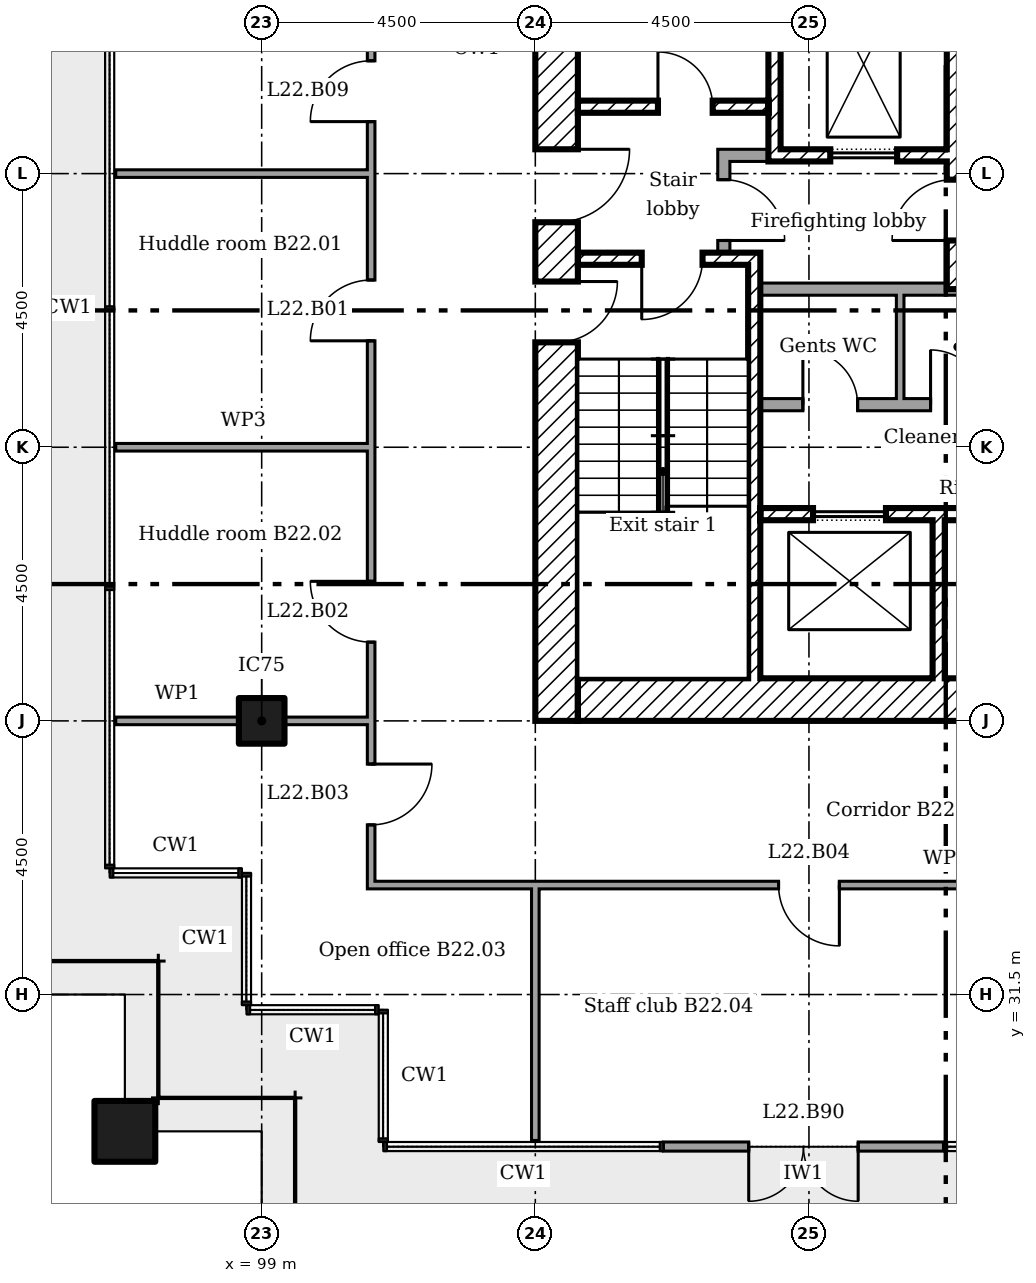
"""IFC4 building model, lengths in metres.
Left out: names, types, materials, properties, quantities, classifications, styles, units other than length and angle.
Written with IfcOpenShell. Run it as: python <this file> out.ifc"""

import sys

from ifc_helpers import new_model, si_unit, direction, frame, frame_2d, origin, origin_2d, place, context, subcontext, project, spatial, rectangle, extrude, element, fill, save


model = new_model("IFC4")
c1 = context("Model", 3, precision=1e-05, world=origin(), true_north=direction((0.0, 1.0)))
c2 = subcontext(c1, "Body", "Model", "MODEL_VIEW")
j1 = project(units=[si_unit("LENGTHUNIT", "METRE"), si_unit("PLANEANGLEUNIT", "RADIAN")], contexts=[c1])
p1 = place(None, origin())
s1 = spatial("IfcSite", under=j1, at=p1, CompositionType="ELEMENT")
p2 = place(p1, origin())
s2 = spatial("IfcBuilding", under=s1, at=p2, CompositionType="ELEMENT")
p3 = place(p2, frame((0.0, 0.0, 92.0)))
s3 = spatial("IfcBuildingStorey", under=s2, at=p3, CompositionType="ELEMENT", Elevation=92.0)
p4 = place(p3, frame((96.75, 29.25, 0.0)))
e1 = element("IfcColumn", 1, at=p4, inside=s3, PredefinedType="COLUMN", context=c2, shape_type="SweptSolid", body=[
    extrude(rectangle(XDim=1.0, YDim=1.0, at=origin_2d()), origin(), (0.0, 0.0, 1.0), 3.6),
])
p5 = place(p3, frame((99.0, 36.0, 0.0)))
e2 = element("IfcColumn", 2, at=p5, inside=s3, PredefinedType="COLUMN", context=c2, shape_type="SweptSolid", body=[
    extrude(rectangle(XDim=0.75, YDim=0.75, at=origin_2d()), origin(), (0.0, 0.0, 1.0), 3.6),
])
p6 = place(p3, frame((105.606, 29.0, 0.0)))
e3 = element("IfcWall", 3, at=p6, inside=s3, PredefinedType="SOLIDWALL", context=c2, shape_type="SweptSolid", body=[
    extrude(rectangle(XDim=4.606, YDim=0.15, at=frame_2d((2.303, 0.0))), origin(), (0.0, 0.0, 1.0), 3.1),
])
p7 = place(p6, frame((1.403, 0.0, 0.0)))
e4 = element("IfcOpeningElement", 4, at=p7, cuts=e3, PredefinedType="OPENING", context=c2, shape_type="SweptSolid", body=[
    extrude(rectangle(XDim=1.8, YDim=2.4, at=frame_2d((0.9, 1.2))), frame((0.0, 0.085, 0.0), z_axis=(0.0, -1.0, 0.0), x_axis=(1.0, 0.0, 0.0)), (0.0, 0.0, 1.0), 0.17),
])
p8 = place(p3, frame((104.2, 36.35, 0.0)))
e5 = element("IfcWall", 5, at=p8, inside=s3, PredefinedType="SHEAR", context=c2, shape_type="SweptSolid", body=[
    extrude(rectangle(XDim=12.1, YDim=0.7, at=frame_2d((6.05, 0.0))), origin(), (0.0, 0.0, 1.0), 3.35),
])
p9 = place(p3, frame((103.85, 36.0, 0.0), z_axis=(0.0, 0.0, 1.0), x_axis=(0.0, 1.0, 0.0)))
e6 = element("IfcWall", 6, at=p9, inside=s3, PredefinedType="SHEAR", context=c2, shape_type="SweptSolid", body=[
    extrude(rectangle(XDim=13.5, YDim=0.7, at=frame_2d((6.75, 0.0))), origin(), (0.0, 0.0, 1.0), 3.35),
])
p10 = place(p9, frame((8.2, 0.0, 0.0)))
e7 = element("IfcOpeningElement", 7, at=p10, cuts=e6, PredefinedType="OPENING", context=c2, shape_type="SweptSolid", body=[
    extrude(rectangle(XDim=1.2, YDim=2.1, at=frame_2d((0.6, 1.05))), frame((0.0, 0.36, 0.0), z_axis=(0.0, -1.0, 0.0), x_axis=(1.0, 0.0, 0.0)), (0.0, 0.0, 1.0), 0.72),
])
p11 = place(p9, frame((6.225, 0.0, 0.0)))
e8 = element("IfcOpeningElement", 8, at=p11, cuts=e6, PredefinedType="OPENING", context=c2, shape_type="SweptSolid", body=[
    extrude(rectangle(XDim=1.0, YDim=2.1, at=frame_2d((0.5, 1.05))), frame((0.0, 0.36, 0.0), z_axis=(0.0, -1.0, 0.0), x_axis=(1.0, 0.0, 0.0)), (0.0, 0.0, 1.0), 0.72),
])
p12 = place(p3, frame((107.433, 48.8, 0.0), z_axis=(0.0, 0.0, 1.0), x_axis=(0.0, -1.0, 0.0)))
e9 = element("IfcWall", 9, at=p12, inside=s3, PredefinedType="SHEAR", context=c2, shape_type="SweptSolid", body=[
    extrude(rectangle(XDim=3.6, YDim=0.2, at=frame_2d((1.8, 0.0))), origin(), (0.0, 0.0, 1.0), 3.35),
])
p13 = place(p3, frame((110.367, 48.8, 0.0), z_axis=(0.0, 0.0, 1.0), x_axis=(0.0, -1.0, 0.0)))
e10 = element("IfcWall", 10, at=p13, inside=s3, PredefinedType="SHEAR", context=c2, shape_type="SweptSolid", body=[
    extrude(rectangle(XDim=5.7, YDim=0.2, at=frame_2d((2.85, 0.0))), origin(), (0.0, 0.0, 1.0), 3.35),
])
p14 = place(p13, frame((3.9, 0.0, 0.0)))
e11 = element("IfcOpeningElement", 11, at=p14, cuts=e10, PredefinedType="OPENING", context=c2, shape_type="SweptSolid", body=[
    extrude(rectangle(XDim=1.0, YDim=2.1, at=frame_2d((0.5, 1.05))), frame((0.0, 0.11, 0.0), z_axis=(0.0, -1.0, 0.0), x_axis=(1.0, 0.0, 0.0)), (0.0, 0.0, 1.0), 0.22),
])
p15 = place(p3, frame((110.133, 36.7, 0.0), z_axis=(0.0, 0.0, 1.0), x_axis=(0.0, 1.0, 0.0)))
e12 = element("IfcWall", 12, at=p15, inside=s3, PredefinedType="SHEAR", context=c2, shape_type="SweptSolid", body=[
    extrude(rectangle(XDim=2.6, YDim=0.2, at=frame_2d((1.3, 0.0))), origin(), (0.0, 0.0, 1.0), 3.35),
])
p16 = place(p3, frame((106.5, 45.3, 0.0)))
e13 = element("IfcWall", 13, at=p16, inside=s3, PredefinedType="PARTITIONING", context=c2, shape_type="SweptSolid", body=[
    extrude(rectangle(XDim=0.833, YDim=0.2, at=frame_2d((0.417, 0.0))), origin(), (0.0, 0.0, 1.0), 3.35),
])
p17 = place(p3, frame((106.6, 43.7, 0.0), z_axis=(0.0, 0.0, 1.0), x_axis=(0.0, 1.0, 0.0)))
e14 = element("IfcWall", 14, at=p17, inside=s3, PredefinedType="PARTITIONING", context=c2, shape_type="SweptSolid", body=[
    extrude(rectangle(XDim=1.5, YDim=0.2, at=frame_2d((0.75, 0.0))), origin(), (0.0, 0.0, 1.0), 3.35),
])
p18 = place(p17, frame((0.2, 0.0, 0.0)))
e15 = element("IfcOpeningElement", 15, at=p18, cuts=e14, PredefinedType="OPENING", context=c2, shape_type="SweptSolid", body=[
    extrude(rectangle(XDim=1.0, YDim=2.1, at=frame_2d((0.5, 1.05))), frame((0.0, 0.11, 0.0), z_axis=(0.0, -1.0, 0.0), x_axis=(1.0, 0.0, 0.0)), (0.0, 0.0, 1.0), 0.22),
])
p19 = place(p3, frame((104.2, 46.1, 0.0)))
e16 = element("IfcWall", 16, at=p19, inside=s3, PredefinedType="SHEAR", context=c2, shape_type="SweptSolid", body=[
    extrude(rectangle(XDim=3.133, YDim=0.2, at=frame_2d((1.567, 0.0))), origin(), (0.0, 0.0, 1.0), 3.35),
])
p20 = place(p19, frame((1.317, 0.0, 0.0)))
e17 = element("IfcOpeningElement", 17, at=p20, cuts=e16, PredefinedType="OPENING", context=c2, shape_type="SweptSolid", body=[
    extrude(rectangle(XDim=0.9, YDim=2.1, at=frame_2d((0.45, 1.05))), frame((0.0, 0.11, 0.0), z_axis=(0.0, -1.0, 0.0), x_axis=(1.0, 0.0, 0.0)), (0.0, 0.0, 1.0), 0.22),
])
p21 = place(p3, frame((107.533, 45.3, 0.0)))
e18 = element("IfcWall", 18, at=p21, inside=s3, PredefinedType="SHEAR", context=c2, shape_type="SweptSolid", body=[
    extrude(rectangle(XDim=2.733, YDim=0.2, at=frame_2d((1.367, 0.0))), origin(), (0.0, 0.0, 1.0), 3.35),
])
p22 = place(p21, frame((0.817, 0.0, 0.0)))
e19 = element("IfcOpeningElement", 19, at=p22, cuts=e18, PredefinedType="OPENING", context=c2, shape_type="SweptSolid", body=[
    extrude(rectangle(XDim=1.1, YDim=2.1, at=frame_2d((0.55, 1.05))), frame((0.0, 0.11, 0.0), z_axis=(0.0, -1.0, 0.0), x_axis=(1.0, 0.0, 0.0)), (0.0, 0.0, 1.0), 0.22),
])
p23 = place(p3, frame((107.2, 39.4, 0.0)))
e20 = element("IfcWall", 20, at=p23, inside=s3, PredefinedType="SHEAR", context=c2, shape_type="SweptSolid", body=[
    extrude(rectangle(XDim=9.1, YDim=0.2, at=frame_2d((4.55, 0.0))), origin(), (0.0, 0.0, 1.0), 3.35),
])
p24 = place(p23, frame((0.867, 0.0, 0.0)))
e21 = element("IfcOpeningElement", 21, at=p24, cuts=e20, PredefinedType="OPENING", context=c2, shape_type="SweptSolid", body=[
    extrude(rectangle(XDim=1.2, YDim=2.1, at=frame_2d((0.6, 1.05))), frame((0.0, 0.11, 0.0), z_axis=(0.0, -1.0, 0.0), x_axis=(1.0, 0.0, 0.0)), (0.0, 0.0, 1.0), 0.22),
])
p25 = place(p23, frame((3.8, 0.0, 0.0)))
e22 = element("IfcOpeningElement", 22, at=p25, cuts=e20, PredefinedType="OPENING", context=c2, shape_type="SweptSolid", body=[
    extrude(rectangle(XDim=1.2, YDim=2.1, at=frame_2d((0.6, 1.05))), frame((0.0, 0.11, 0.0), z_axis=(0.0, -1.0, 0.0), x_axis=(1.0, 0.0, 0.0)), (0.0, 0.0, 1.0), 0.22),
])
p26 = place(p23, frame((6.733, 0.0, 0.0)))
e23 = element("IfcOpeningElement", 23, at=p26, cuts=e20, PredefinedType="OPENING", context=c2, shape_type="SweptSolid", body=[
    extrude(rectangle(XDim=1.2, YDim=2.1, at=frame_2d((0.6, 1.05))), frame((0.0, 0.11, 0.0), z_axis=(0.0, -1.0, 0.0), x_axis=(1.0, 0.0, 0.0)), (0.0, 0.0, 1.0), 0.22),
])
p27 = place(p3, frame((107.1, 36.7, 0.0), z_axis=(0.0, 0.0, 1.0), x_axis=(0.0, 1.0, 0.0)))
e24 = element("IfcWall", 24, at=p27, inside=s3, PredefinedType="SHEAR", context=c2, shape_type="SweptSolid", body=[
    extrude(rectangle(XDim=7.0, YDim=0.2, at=frame_2d((3.5, 0.0))), origin(), (0.0, 0.0, 1.0), 3.35),
])
p28 = place(p3, frame((104.2, 43.6, 0.0)))
e25 = element("IfcWall", 25, at=p28, inside=s3, PredefinedType="SHEAR", context=c2, shape_type="SweptSolid", body=[
    extrude(rectangle(XDim=2.8, YDim=0.2, at=frame_2d((1.4, 0.0))), origin(), (0.0, 0.0, 1.0), 3.35),
])
p29 = place(p28, frame((1.05, 0.0, 0.0)))
e26 = element("IfcOpeningElement", 26, at=p29, cuts=e25, PredefinedType="OPENING", context=c2, shape_type="SweptSolid", body=[
    extrude(rectangle(XDim=1.0, YDim=2.1, at=frame_2d((0.5, 1.05))), frame((0.0, 0.11, 0.0), z_axis=(0.0, -1.0, 0.0), x_axis=(1.0, 0.0, 0.0)), (0.0, 0.0, 1.0), 0.22),
])
p30 = place(p3, frame((107.2, 43.1, 0.0)))
e27 = element("IfcWall", 27, at=p30, inside=s3, PredefinedType="PARTITIONING", context=c2, shape_type="SweptSolid", body=[
    extrude(rectangle(XDim=6.1, YDim=0.2, at=frame_2d((3.05, 0.0))), origin(), (0.0, 0.0, 1.0), 3.35),
])
p31 = place(p30, frame((4.7, 0.0, 0.0)))
e28 = element("IfcOpeningElement", 28, at=p31, cuts=e27, PredefinedType="OPENING", context=c2, shape_type="SweptSolid", body=[
    extrude(rectangle(XDim=0.9, YDim=2.1, at=frame_2d((0.45, 1.05))), frame((0.0, 0.11, 0.0), z_axis=(0.0, -1.0, 0.0), x_axis=(1.0, 0.0, 0.0)), (0.0, 0.0, 1.0), 0.22),
])
p32 = place(p3, frame((107.2, 41.2, 0.0)))
e29 = element("IfcWall", 29, at=p32, inside=s3, PredefinedType="PARTITIONING", context=c2, shape_type="SweptSolid", body=[
    extrude(rectangle(XDim=6.1, YDim=0.2, at=frame_2d((3.05, 0.0))), origin(), (0.0, 0.0, 1.0), 3.35),
])
p33 = place(p32, frame((0.7, 0.0, 0.0)))
e30 = element("IfcOpeningElement", 30, at=p33, cuts=e29, PredefinedType="OPENING", context=c2, shape_type="SweptSolid", body=[
    extrude(rectangle(XDim=0.9, YDim=2.1, at=frame_2d((0.45, 1.05))), frame((0.0, 0.11, 0.0), z_axis=(0.0, -1.0, 0.0), x_axis=(1.0, 0.0, 0.0)), (0.0, 0.0, 1.0), 0.22),
])
p34 = place(p32, frame((2.8, 0.0, 0.0)))
e31 = element("IfcOpeningElement", 31, at=p34, cuts=e29, PredefinedType="OPENING", context=c2, shape_type="SweptSolid", body=[
    extrude(rectangle(XDim=0.9, YDim=2.1, at=frame_2d((0.45, 1.05))), frame((0.0, 0.11, 0.0), z_axis=(0.0, -1.0, 0.0), x_axis=(1.0, 0.0, 0.0)), (0.0, 0.0, 1.0), 0.22),
])
p35 = place(p3, frame((109.5, 41.3, 0.0), z_axis=(0.0, 0.0, 1.0), x_axis=(0.0, 1.0, 0.0)))
e32 = element("IfcWall", 32, at=p35, inside=s3, PredefinedType="PARTITIONING", context=c2, shape_type="SweptSolid", body=[
    extrude(rectangle(XDim=1.7, YDim=0.125, at=frame_2d((0.85, 0.0))), origin(), (0.0, 0.0, 1.0), 3.35),
])
p36 = place(p3, frame((100.738, 33.3, 0.0)))
e33 = element("IfcWall", 33, at=p36, inside=s3, PredefinedType="PARTITIONING", context=c2, shape_type="SweptSolid", body=[
    extrude(rectangle(XDim=19.025, YDim=0.125, at=frame_2d((9.512, 0.0))), origin(), (0.0, 0.0, 1.0), 3.45),
])
p37 = place(p36, frame((6.762, 0.0, 0.0)))
e34 = element("IfcOpeningElement", 34, at=p37, cuts=e33, PredefinedType="OPENING", context=c2, shape_type="SweptSolid", body=[
    extrude(rectangle(XDim=1.0, YDim=2.1, at=frame_2d((0.5, 1.05))), frame((0.0, 0.073, 0.0), z_axis=(0.0, -1.0, 0.0), x_axis=(1.0, 0.0, 0.0)), (0.0, 0.0, 1.0), 0.145),
])
p38 = place(p36, frame((13.058, 0.0, 0.0)))
e35 = element("IfcOpeningElement", 35, at=p38, cuts=e33, PredefinedType="OPENING", context=c2, shape_type="SweptSolid", body=[
    extrude(rectangle(XDim=1.0, YDim=2.1, at=frame_2d((0.5, 1.05))), frame((0.0, 0.073, 0.0), z_axis=(0.0, -1.0, 0.0), x_axis=(1.0, 0.0, 0.0)), (0.0, 0.0, 1.0), 0.145),
])
p39 = place(p3, frame((96.6, 36.0, 0.0)))
e36 = element("IfcWall", 36, at=p39, inside=s3, PredefinedType="PARTITIONING", context=c2, shape_type="SweptSolid", body=[
    extrude(rectangle(XDim=2.025, YDim=0.125, at=frame_2d((1.012, 0.0))), origin(), (0.0, 0.0, 1.0), 2.842),
])
p40 = place(p3, frame((99.375, 36.0, 0.0)))
e37 = element("IfcWall", 37, at=p40, inside=s3, PredefinedType="PARTITIONING", context=c2, shape_type="SweptSolid", body=[
    extrude(rectangle(XDim=1.425, YDim=0.125, at=frame_2d((0.712, 0.0))), origin(), (0.0, 0.0, 1.0), 2.842),
])
p41 = place(p3, frame((96.6, 40.5, 0.0)))
e38 = element("IfcWall", 38, at=p41, inside=s3, PredefinedType="MOVABLE", context=c2, shape_type="SweptSolid", body=[
    extrude(rectangle(XDim=4.2, YDim=0.125, at=frame_2d((2.1, 0.0))), origin(), (0.0, 0.0, 1.0), 2.851),
])
p42 = place(p3, frame((96.6, 45.0, 0.0)))
e39 = element("IfcWall", 39, at=p42, inside=s3, PredefinedType="PARTITIONING", context=c2, shape_type="SweptSolid", body=[
    extrude(rectangle(XDim=4.2, YDim=0.125, at=frame_2d((2.1, 0.0))), origin(), (0.0, 0.0, 1.0), 2.851),
])
p43 = place(p3, frame((100.8, 33.363, 0.0), z_axis=(0.0, 0.0, 1.0), x_axis=(0.0, 1.0, 0.0)))
e40 = element("IfcWall", 40, at=p43, inside=s3, PredefinedType="PARTITIONING", context=c2, shape_type="SweptSolid", body=[
    extrude(rectangle(XDim=14.075, YDim=0.125, at=frame_2d((7.038, 0.0))), origin(), (0.0, 0.0, 1.0), 3.45),
])
p44 = place(p43, frame((8.887, 0.0, 0.0)))
e41 = element("IfcOpeningElement", 41, at=p44, cuts=e40, PredefinedType="OPENING", context=c2, shape_type="SweptSolid", body=[
    extrude(rectangle(XDim=1.0, YDim=2.1, at=frame_2d((0.5, 1.05))), frame((0.0, 0.073, 0.0), z_axis=(0.0, -1.0, 0.0), x_axis=(1.0, 0.0, 0.0)), (0.0, 0.0, 1.0), 0.145),
])
p45 = place(p43, frame((3.933, 0.0, 0.0)))
e42 = element("IfcOpeningElement", 42, at=p45, cuts=e40, PredefinedType="OPENING", context=c2, shape_type="SweptSolid", body=[
    extrude(rectangle(XDim=1.0, YDim=2.1, at=frame_2d((0.5, 1.05))), frame((0.0, 0.073, 0.0), z_axis=(0.0, -1.0, 0.0), x_axis=(1.0, 0.0, 0.0)), (0.0, 0.0, 1.0), 0.145),
])
p46 = place(p43, frame((0.927, 0.0, 0.0)))
e43 = element("IfcOpeningElement", 43, at=p46, cuts=e40, PredefinedType="OPENING", context=c2, shape_type="SweptSolid", body=[
    extrude(rectangle(XDim=1.0, YDim=2.1, at=frame_2d((0.5, 1.05))), frame((0.0, 0.073, 0.0), z_axis=(0.0, -1.0, 0.0), x_axis=(1.0, 0.0, 0.0)), (0.0, 0.0, 1.0), 0.145),
])
p47 = place(p43, frame((12.492, 0.0, 0.0)))
e44 = element("IfcOpeningElement", 44, at=p47, cuts=e40, PredefinedType="OPENING", context=c2, shape_type="SweptSolid", body=[
    extrude(rectangle(XDim=1.0, YDim=2.1, at=frame_2d((0.5, 1.05))), frame((0.0, 0.073, 0.0), z_axis=(0.0, -1.0, 0.0), x_axis=(1.0, 0.0, 0.0)), (0.0, 0.0, 1.0), 0.145),
])
p48 = place(p3, frame((103.5, 29.1, 0.0), z_axis=(0.0, 0.0, 1.0), x_axis=(0.0, 1.0, 0.0)))
e45 = element("IfcWall", 45, at=p48, inside=s3, PredefinedType="PARTITIONING", context=c2, shape_type="SweptSolid", body=[
    extrude(rectangle(XDim=4.2, YDim=0.125, at=frame_2d((2.1, 0.0))), origin(), (0.0, 0.0, 1.0), 2.851),
])
p49 = place(p7, frame((1.8, 0.0, 0.0), x_axis=(-1.0, 0.0, 0.0)))
e46 = element("IfcDoor", 46, at=p49, inside=s3, OperationType="DOUBLE_DOOR_DOUBLE_SWING", PredefinedType="NOTDEFINED", context=c2, shape_type="SweptSolid", body=[
    extrude(rectangle(XDim=1.8, YDim=2.4, at=frame_2d((0.9, 1.2))), frame((0.0, 0.025, 0.0), z_axis=(0.0, -1.0, 0.0), x_axis=(1.0, 0.0, 0.0)), (0.0, 0.0, 1.0), 0.05),
])
fill(e4, e46)
p50 = place(p10, frame((1.2, 0.0, 0.0), x_axis=(-1.0, 0.0, 0.0)))
e47 = element("IfcDoor", 47, at=p50, inside=s3, OperationType="SINGLE_SWING_RIGHT", PredefinedType="DOOR", context=c2, shape_type="SweptSolid", body=[
    extrude(rectangle(XDim=1.2, YDim=2.1, at=frame_2d((0.6, 1.05))), frame((0.0, 0.025, 0.0), z_axis=(0.0, -1.0, 0.0), x_axis=(1.0, 0.0, 0.0)), (0.0, 0.0, 1.0), 0.05),
])
fill(e7, e47)
p51 = place(p29, frame((1.0, 0.0, 0.0), x_axis=(-1.0, 0.0, 0.0)))
e48 = element("IfcDoor", 48, at=p51, inside=s3, OperationType="SINGLE_SWING_LEFT", PredefinedType="DOOR", context=c2, shape_type="SweptSolid", body=[
    extrude(rectangle(XDim=1.0, YDim=2.1, at=frame_2d((0.5, 1.05))), frame((0.0, 0.025, 0.0), z_axis=(0.0, -1.0, 0.0), x_axis=(1.0, 0.0, 0.0)), (0.0, 0.0, 1.0), 0.05),
])
fill(e26, e48)
p52 = place(p11, frame((1.0, 0.0, 0.0), x_axis=(-1.0, 0.0, 0.0)))
e49 = element("IfcDoor", 49, at=p52, inside=s3, OperationType="SINGLE_SWING_RIGHT", PredefinedType="DOOR", context=c2, shape_type="SweptSolid", body=[
    extrude(rectangle(XDim=1.0, YDim=2.1, at=frame_2d((0.5, 1.05))), frame((0.0, 0.025, 0.0), z_axis=(0.0, -1.0, 0.0), x_axis=(1.0, 0.0, 0.0)), (0.0, 0.0, 1.0), 0.05),
])
fill(e8, e49)
p53 = place(p14, frame((1.0, 0.0, 0.0), x_axis=(-1.0, 0.0, 0.0)))
e50 = element("IfcDoor", 50, at=p53, inside=s3, OperationType="SINGLE_SWING_RIGHT", PredefinedType="DOOR", context=c2, shape_type="SweptSolid", body=[
    extrude(rectangle(XDim=1.0, YDim=2.1, at=frame_2d((0.5, 1.05))), frame((0.0, 0.025, 0.0), z_axis=(0.0, -1.0, 0.0), x_axis=(1.0, 0.0, 0.0)), (0.0, 0.0, 1.0), 0.05),
])
fill(e11, e50)
p54 = place(p18, frame((1.0, 0.0, 0.0), x_axis=(-1.0, 0.0, 0.0)))
e51 = element("IfcDoor", 51, at=p54, inside=s3, OperationType="SINGLE_SWING_LEFT", PredefinedType="DOOR", context=c2, shape_type="SweptSolid", body=[
    extrude(rectangle(XDim=1.0, YDim=2.1, at=frame_2d((0.5, 1.05))), frame((0.0, 0.025, 0.0), z_axis=(0.0, -1.0, 0.0), x_axis=(1.0, 0.0, 0.0)), (0.0, 0.0, 1.0), 0.05),
])
fill(e15, e51)
p55 = place(p20, origin())
e52 = element("IfcDoor", 52, at=p55, inside=s3, OperationType="SINGLE_SWING_RIGHT", PredefinedType="DOOR", context=c2, shape_type="SweptSolid", body=[
    extrude(rectangle(XDim=0.9, YDim=2.1, at=frame_2d((0.45, 1.05))), frame((0.0, 0.025, 0.0), z_axis=(0.0, -1.0, 0.0), x_axis=(1.0, 0.0, 0.0)), (0.0, 0.0, 1.0), 0.05),
])
fill(e17, e52)
p56 = place(p33, origin())
e53 = element("IfcDoor", 53, at=p56, inside=s3, OperationType="SINGLE_SWING_RIGHT", PredefinedType="DOOR", context=c2, shape_type="SweptSolid", body=[
    extrude(rectangle(XDim=0.9, YDim=2.1, at=frame_2d((0.45, 1.05))), frame((0.0, 0.025, 0.0), z_axis=(0.0, -1.0, 0.0), x_axis=(1.0, 0.0, 0.0)), (0.0, 0.0, 1.0), 0.05),
])
fill(e30, e53)
p57 = place(p34, origin())
e54 = element("IfcDoor", 54, at=p57, inside=s3, OperationType="SINGLE_SWING_RIGHT", PredefinedType="DOOR", context=c2, shape_type="SweptSolid", body=[
    extrude(rectangle(XDim=0.9, YDim=2.1, at=frame_2d((0.45, 1.05))), frame((0.0, 0.025, 0.0), z_axis=(0.0, -1.0, 0.0), x_axis=(1.0, 0.0, 0.0)), (0.0, 0.0, 1.0), 0.05),
])
fill(e31, e54)
p58 = place(p22, origin())
e55 = element("IfcDoor", 55, at=p58, inside=s3, OperationType="SLIDING_TO_LEFT", PredefinedType="DOOR", context=c2, shape_type="SweptSolid", body=[
    extrude(rectangle(XDim=1.1, YDim=2.1, at=frame_2d((0.55, 1.05))), frame((0.0, 0.025, 0.0), z_axis=(0.0, -1.0, 0.0), x_axis=(1.0, 0.0, 0.0)), (0.0, 0.0, 1.0), 0.05),
])
fill(e19, e55)
p59 = place(p24, origin())
e56 = element("IfcDoor", 56, at=p59, inside=s3, OperationType="SLIDING_TO_LEFT", PredefinedType="DOOR", context=c2, shape_type="SweptSolid", body=[
    extrude(rectangle(XDim=1.2, YDim=2.1, at=frame_2d((0.6, 1.05))), frame((0.0, 0.025, 0.0), z_axis=(0.0, -1.0, 0.0), x_axis=(1.0, 0.0, 0.0)), (0.0, 0.0, 1.0), 0.05),
])
fill(e21, e56)
p60 = place(p44, origin())
e57 = element("IfcDoor", 57, at=p60, inside=s3, OperationType="SINGLE_SWING_RIGHT", PredefinedType="DOOR", context=c2, shape_type="SweptSolid", body=[
    extrude(rectangle(XDim=1.0, YDim=2.1, at=frame_2d((0.5, 1.05))), frame((0.0, 0.025, 0.0), z_axis=(0.0, -1.0, 0.0), x_axis=(1.0, 0.0, 0.0)), (0.0, 0.0, 1.0), 0.05),
])
fill(e41, e57)
p61 = place(p45, origin())
e58 = element("IfcDoor", 58, at=p61, inside=s3, OperationType="SINGLE_SWING_LEFT", PredefinedType="DOOR", context=c2, shape_type="SweptSolid", body=[
    extrude(rectangle(XDim=1.0, YDim=2.1, at=frame_2d((0.5, 1.05))), frame((0.0, 0.025, 0.0), z_axis=(0.0, -1.0, 0.0), x_axis=(1.0, 0.0, 0.0)), (0.0, 0.0, 1.0), 0.05),
])
fill(e42, e58)
p62 = place(p46, frame((1.0, 0.0, 0.0), x_axis=(-1.0, 0.0, 0.0)))
e59 = element("IfcDoor", 59, at=p62, inside=s3, OperationType="SINGLE_SWING_RIGHT", PredefinedType="DOOR", context=c2, shape_type="SweptSolid", body=[
    extrude(rectangle(XDim=1.0, YDim=2.1, at=frame_2d((0.5, 1.05))), frame((0.0, 0.025, 0.0), z_axis=(0.0, -1.0, 0.0), x_axis=(1.0, 0.0, 0.0)), (0.0, 0.0, 1.0), 0.05),
])
fill(e43, e59)
p63 = place(p37, frame((1.0, 0.0, 0.0), x_axis=(-1.0, 0.0, 0.0)))
e60 = element("IfcDoor", 60, at=p63, inside=s3, OperationType="SINGLE_SWING_RIGHT", PredefinedType="DOOR", context=c2, shape_type="SweptSolid", body=[
    extrude(rectangle(XDim=1.0, YDim=2.1, at=frame_2d((0.5, 1.05))), frame((0.0, 0.025, 0.0), z_axis=(0.0, -1.0, 0.0), x_axis=(1.0, 0.0, 0.0)), (0.0, 0.0, 1.0), 0.05),
])
fill(e34, e60)
p64 = place(p47, origin())
e61 = element("IfcDoor", 61, at=p64, inside=s3, OperationType="SINGLE_SWING_RIGHT", PredefinedType="DOOR", context=c2, shape_type="SweptSolid", body=[
    extrude(rectangle(XDim=1.0, YDim=2.1, at=frame_2d((0.5, 1.05))), frame((0.0, 0.025, 0.0), z_axis=(0.0, -1.0, 0.0), x_axis=(1.0, 0.0, 0.0)), (0.0, 0.0, 1.0), 0.05),
])
fill(e44, e61)
save(model, sys.argv[1])
